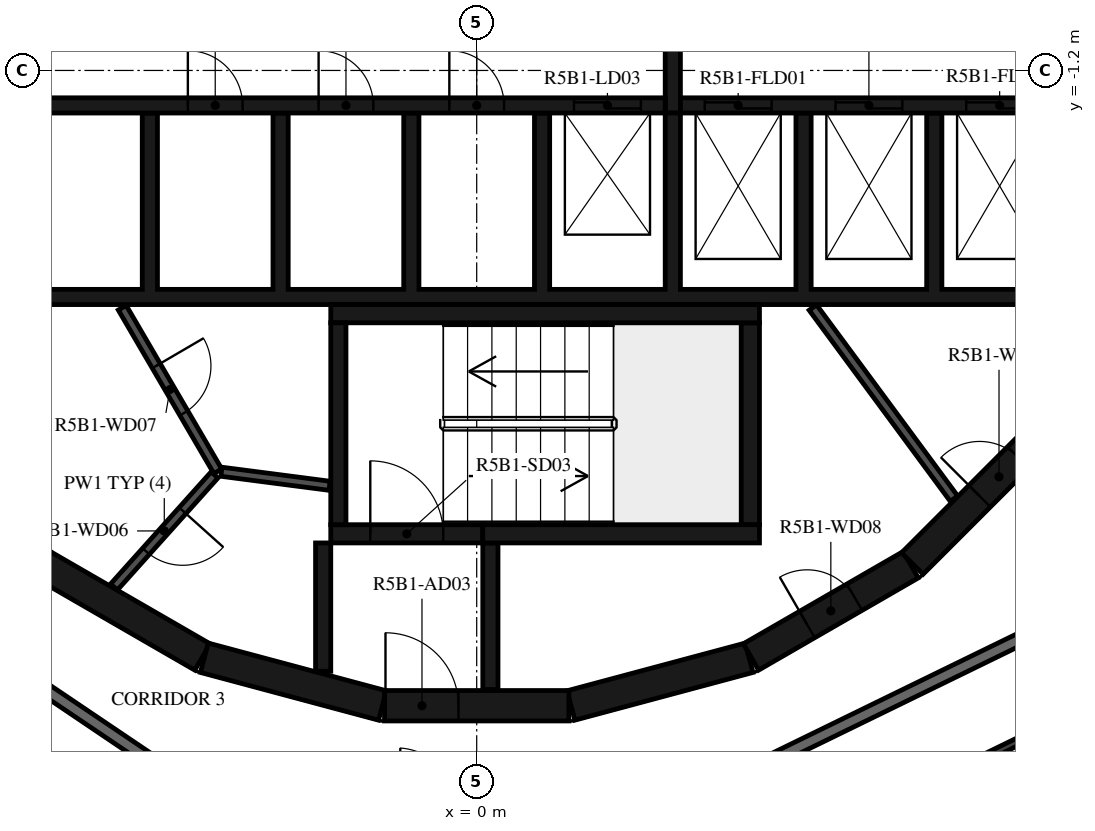
"""IFC4 building model, lengths in metres.
Left out: names, types, materials, properties, quantities, classifications, styles, units other than length and angle.
Written with IfcOpenShell. Run it as: python <this file> out.ifc"""

import sys

from ifc_helpers import new_model, si_unit, direction, frame, frame_2d, origin, place, context, subcontext, project, spatial, polyline, rectangle, outline, extrude, element, fill, save


model = new_model("IFC4")
c1 = context("Model", 3, precision=1e-05, world=origin(), true_north=direction((0.0, 1.0)))
c2 = subcontext(c1, "Body", "Model", "MODEL_VIEW")
j1 = project(units=[si_unit("LENGTHUNIT", "METRE"), si_unit("PLANEANGLEUNIT", "RADIAN")], contexts=[c1])
p1 = place(None, origin())
s1 = spatial("IfcSite", under=j1, at=p1, CompositionType="ELEMENT")
p2 = place(p1, origin())
s2 = spatial("IfcBuilding", under=s1, at=p2, CompositionType="ELEMENT")
p3 = place(p2, frame((0.0, 0.0, 198.9)))
s3 = spatial("IfcBuildingStorey", under=s2, at=p3, CompositionType="ELEMENT", Elevation=198.9)
p4 = place(p3, frame((1.55, -11.643, 0.0), z_axis=(0.0, 0.0, 1.0), x_axis=(0.965948410781, 0.258734743916, 0.0)))
e1 = element("IfcWall", 1, at=p4, inside=s3, PredefinedType="SHEAR", context=c2, shape_type="SweptSolid", body=[
    extrude(rectangle(XDim=3.033, YDim=0.5, at=frame_2d((1.516, 0.0))), origin(), (0.0, 0.0, 1.0), 3.12),
])
p5 = place(p3, frame((4.51, -10.845, 0.0), z_axis=(0.0, 0.0, 1.0), x_axis=(0.865975092491, 0.500087131594, 0.0)))
e2 = element("IfcWall", 2, at=p5, inside=s3, PredefinedType="SHEAR", context=c2, shape_type="SweptSolid", body=[
    extrude(rectangle(XDim=3.033, YDim=0.5, at=frame_2d((1.516, 0.0))), origin(), (0.0, 0.0, 1.0), 3.12),
])
p6 = place(p5, frame((1.066, 0.0, 0.0)))
e3 = element("IfcOpeningElement", 3, at=p6, cuts=e2, PredefinedType="OPENING", context=c2, shape_type="SweptSolid", body=[
    extrude(rectangle(XDim=0.9, YDim=2.1, at=frame_2d((0.45, 1.05))), frame((0.0, 0.26, 0.0), z_axis=(0.0, -1.0, 0.0), x_axis=(1.0, 0.0, 0.0)), (0.0, 0.0, 1.0), 0.52),
])
p7 = place(p3, frame((7.164, -9.308, 0.0), z_axis=(0.0, 0.0, 1.0), x_axis=(0.707106781187, 0.707106781187, 0.0)))
e4 = element("IfcWall", 4, at=p7, inside=s3, PredefinedType="SHEAR", context=c2, shape_type="SweptSolid", body=[
    extrude(rectangle(XDim=3.032, YDim=0.5, at=frame_2d((1.516, 0.0))), origin(), (0.0, 0.0, 1.0), 3.12),
])
p8 = place(p7, frame((1.566, 0.0, 0.0)))
e5 = element("IfcOpeningElement", 5, at=p8, cuts=e4, PredefinedType="OPENING", context=c2, shape_type="SweptSolid", body=[
    extrude(rectangle(XDim=0.9, YDim=2.1, at=frame_2d((0.45, 1.05))), frame((0.0, 0.26, 0.0), z_axis=(0.0, -1.0, 0.0), x_axis=(1.0, 0.0, 0.0)), (0.0, 0.0, 1.0), 0.52),
])
for number, where, z_axis, x_axis in (
    (6, (-7.137, -9.329, 0.0), (0.0, 0.0, 1.0), (0.866, -0.5, 0.0)),
    (7, (-4.479, -10.858, 0.0), (0.0, 0.0, 1.0), (0.966, -0.259, 0.0)),
):
    element("IfcWall", number, at=place(p3, frame(where, z_axis=z_axis, x_axis=x_axis)), inside=s3, PredefinedType="SHEAR", context=c2, shape_type="SweptSolid", body=[
        extrude(rectangle(XDim=3.033, YDim=0.5, at=frame_2d((1.516, 0.0))), origin(), (0.0, 0.0, 1.0), 3.12),
    ])
p9 = place(p3, frame((-1.516, -11.647, 0.0), z_axis=(0.0, 0.0, 1.0), x_axis=(1.0, 0.0, 0.0)))
e8 = element("IfcWall", 8, at=p9, inside=s3, PredefinedType="SHEAR", context=c2, shape_type="SweptSolid", body=[
    extrude(rectangle(XDim=3.033, YDim=0.5, at=frame_2d((1.516, 0.0))), origin(), (0.0, 0.0, 1.0), 3.12),
])
p10 = place(p9, frame((0.016, 0.0, 0.0)))
e9 = element("IfcOpeningElement", 9, at=p10, cuts=e8, PredefinedType="OPENING", context=c2, shape_type="SweptSolid", body=[
    extrude(rectangle(XDim=1.2, YDim=2.1, at=frame_2d((0.6, 1.05))), frame((0.0, 0.26, 0.0), z_axis=(0.0, -1.0, 0.0), x_axis=(1.0, 0.0, 0.0)), (0.0, 0.0, 1.0), 0.52),
])
p11 = place(p3, frame((-2.275, -8.67, 0.0), z_axis=(0.0, 0.0, 1.0), x_axis=(0.0, 1.0, 0.0)))
e10 = element("IfcWall", 10, at=p11, inside=s3, PredefinedType="SHEAR", context=c2, shape_type="SweptSolid", body=[
    extrude(rectangle(XDim=3.32, YDim=0.25, at=frame_2d((1.66, 0.0))), origin(), (0.0, 0.0, 1.0), 3.12),
])
p12 = place(p3, frame((-2.4, -5.2, 0.0), z_axis=(0.0, 0.0, 1.0), x_axis=(1.0, 0.0, 0.0)))
e11 = element("IfcWall", 11, at=p12, inside=s3, PredefinedType="SHEAR", context=c2, shape_type="SweptSolid", body=[
    extrude(rectangle(XDim=7.05, YDim=0.3, at=frame_2d((3.525, 0.0))), origin(), (0.0, 0.0, 1.0), 3.12),
])
p13 = place(p3, frame((4.5, -8.67, 0.0), z_axis=(0.0, 0.0, 1.0), x_axis=(0.0, 1.0, 0.0)))
e12 = element("IfcWall", 12, at=p13, inside=s3, PredefinedType="SHEAR", context=c2, shape_type="SweptSolid", body=[
    extrude(rectangle(XDim=3.32, YDim=0.3, at=frame_2d((1.66, 0.0))), origin(), (0.0, 0.0, 1.0), 3.12),
])
p14 = place(p3, frame((0.1, -8.82, 0.0), z_axis=(0.0, 0.0, 1.0), x_axis=(1.0, 0.0, 0.0)))
e13 = element("IfcWall", 13, at=p14, inside=s3, PredefinedType="SHEAR", context=c2, shape_type="SweptSolid", body=[
    extrude(rectangle(XDim=4.55, YDim=0.3, at=frame_2d((2.275, 0.0))), origin(), (0.0, 0.0, 1.0), 3.12),
])
p15 = place(p3, frame((-2.4, -8.82, 0.0), z_axis=(0.0, 0.0, 1.0), x_axis=(1.0, 0.0, 0.0)))
e14 = element("IfcWall", 14, at=p15, inside=s3, PredefinedType="SHEAR", context=c2, shape_type="SweptSolid", body=[
    extrude(rectangle(XDim=2.5, YDim=0.3, at=frame_2d((1.25, 0.0))), origin(), (0.0, 0.0, 1.0), 3.12),
])
p16 = place(p15, frame((0.65, 0.0, 0.0)))
e15 = element("IfcOpeningElement", 15, at=p16, cuts=e14, PredefinedType="OPENING", context=c2, shape_type="SweptSolid", body=[
    extrude(rectangle(XDim=1.2, YDim=2.1, at=frame_2d((0.6, 1.05))), frame((0.0, 0.16, 0.0), z_axis=(0.0, -1.0, 0.0), x_axis=(1.0, 0.0, 0.0)), (0.0, 0.0, 1.0), 0.32),
])
p17 = place(p3, frame((-2.525, -8.97, 0.0), z_axis=(0.0, 0.0, 1.0), x_axis=(0.0, -1.0, 0.0)))
e16 = element("IfcWall", 16, at=p17, inside=s3, PredefinedType="SHEAR", context=c2, shape_type="SweptSolid", body=[
    extrude(rectangle(XDim=2.11, YDim=0.25, at=frame_2d((1.055, 0.0))), origin(), (0.0, 0.0, 1.0), 3.12),
])
p18 = place(p3, frame((0.225, -8.97, 0.0), z_axis=(0.0, 0.0, 1.0), x_axis=(0.0, -1.0, 0.0)))
e17 = element("IfcWall", 17, at=p18, inside=s3, PredefinedType="SHEAR", context=c2, shape_type="SweptSolid", body=[
    extrude(rectangle(XDim=2.41, YDim=0.25, at=frame_2d((1.205, 0.0))), origin(), (0.0, 0.0, 1.0), 3.12),
])
p19 = place(p3, origin())
e18 = element("IfcWall", 18, at=p19, inside=s3, PredefinedType="SHEAR", context=c2, shape_type="SweptSolid", body=[
    extrude(outline(polyline([(9.8, -5.05), (9.8, -4.8), (9.8, -1.9), (9.55, -1.9), (9.55, -4.8), (7.65, -4.8), (7.65, -1.9), (7.4, -1.9), (7.4, -4.8), (5.5, -4.8), (5.5, -1.9), (5.25, -1.9), (5.25, -4.8), (3.35, -4.8), (3.35, -1.9), (3.1, -1.9), (3.1, -4.8), (1.2, -4.8), (1.2, -1.9), (0.95, -1.9), (0.95, -4.8), (-0.95, -4.8), (-0.95, -1.9), (-1.2, -1.9), (-1.2, -4.8), (-3.1, -4.8), (-3.1, -1.9), (-3.35, -1.9), (-3.35, -4.8), (-5.25, -4.8), (-5.25, -1.9), (-5.5, -1.9), (-5.5, -4.8), (-7.4, -4.8), (-7.4, -1.9), (-7.65, -1.9), (-7.65, -4.8), (-9.55, -4.8), (-9.55, -1.9), (-9.8, -1.9), (-9.8, -4.8), (-9.8, -5.05), (9.8, -5.05)])), origin(), (0.0, 0.0, 1.0), 3.12),
])
p20 = place(p3, frame((-11.28, -1.775, 0.0), z_axis=(0.0, 0.0, 1.0), x_axis=(1.0, 0.0, 0.0)))
e19 = element("IfcWall", 19, at=p20, inside=s3, PredefinedType="SHEAR", context=c2, shape_type="SweptSolid", body=[
    extrude(rectangle(XDim=14.38, YDim=0.25, at=frame_2d((7.19, 0.0))), origin(), (0.0, 0.0, 1.0), 3.12),
])
p21 = place(p20, frame((12.88, 0.0, 0.0)))
e20 = element("IfcOpeningElement", 20, at=p21, cuts=e19, PredefinedType="OPENING", context=c2, shape_type="SweptSolid", body=[
    extrude(rectangle(XDim=1.1, YDim=2.1, at=frame_2d((0.55, 1.05))), frame((0.0, 0.135, 0.0), z_axis=(0.0, -1.0, 0.0), x_axis=(1.0, 0.0, 0.0)), (0.0, 0.0, 1.0), 0.27),
])
p22 = place(p20, frame((6.53, 0.0, 0.0)))
e21 = element("IfcOpeningElement", 21, at=p22, cuts=e19, PredefinedType="OPENING", context=c2, shape_type="SweptSolid", body=[
    extrude(rectangle(XDim=0.9, YDim=2.1, at=frame_2d((0.45, 1.05))), frame((0.0, 0.135, 0.0), z_axis=(0.0, -1.0, 0.0), x_axis=(1.0, 0.0, 0.0)), (0.0, 0.0, 1.0), 0.27),
])
p23 = place(p20, frame((8.68, 0.0, 0.0)))
e22 = element("IfcOpeningElement", 22, at=p23, cuts=e19, PredefinedType="OPENING", context=c2, shape_type="SweptSolid", body=[
    extrude(rectangle(XDim=0.9, YDim=2.1, at=frame_2d((0.45, 1.05))), frame((0.0, 0.135, 0.0), z_axis=(0.0, -1.0, 0.0), x_axis=(1.0, 0.0, 0.0)), (0.0, 0.0, 1.0), 0.27),
])
p24 = place(p20, frame((10.83, 0.0, 0.0)))
e23 = element("IfcOpeningElement", 23, at=p24, cuts=e19, PredefinedType="OPENING", context=c2, shape_type="SweptSolid", body=[
    extrude(rectangle(XDim=0.9, YDim=2.1, at=frame_2d((0.45, 1.05))), frame((0.0, 0.135, 0.0), z_axis=(0.0, -1.0, 0.0), x_axis=(1.0, 0.0, 0.0)), (0.0, 0.0, 1.0), 0.27),
])
p25 = place(p3, frame((3.35, -1.775, 0.0), z_axis=(0.0, 0.0, 1.0), x_axis=(1.0, 0.0, 0.0)))
e24 = element("IfcWall", 24, at=p25, inside=s3, PredefinedType="SHEAR", context=c2, shape_type="SweptSolid", body=[
    extrude(rectangle(XDim=7.93, YDim=0.25, at=frame_2d((3.965, 0.0))), origin(), (0.0, 0.0, 1.0), 3.12),
])
p26 = place(p25, frame((0.4, 0.0, 0.0)))
e25 = element("IfcOpeningElement", 25, at=p26, cuts=e24, PredefinedType="OPENING", context=c2, shape_type="SweptSolid", body=[
    extrude(rectangle(XDim=1.1, YDim=2.4, at=frame_2d((0.55, 1.2))), frame((0.0, 0.135, 0.0), z_axis=(0.0, -1.0, 0.0), x_axis=(1.0, 0.0, 0.0)), (0.0, 0.0, 1.0), 0.27),
])
p27 = place(p25, frame((2.55, 0.0, 0.0)))
e26 = element("IfcOpeningElement", 26, at=p27, cuts=e24, PredefinedType="OPENING", context=c2, shape_type="SweptSolid", body=[
    extrude(rectangle(XDim=1.1, YDim=2.4, at=frame_2d((0.55, 1.2))), frame((0.0, 0.135, 0.0), z_axis=(0.0, -1.0, 0.0), x_axis=(1.0, 0.0, 0.0)), (0.0, 0.0, 1.0), 0.27),
])
p28 = place(p25, frame((4.7, 0.0, 0.0)))
e27 = element("IfcOpeningElement", 27, at=p28, cuts=e24, PredefinedType="OPENING", context=c2, shape_type="SweptSolid", body=[
    extrude(rectangle(XDim=1.1, YDim=2.4, at=frame_2d((0.55, 1.2))), frame((0.0, 0.135, 0.0), z_axis=(0.0, -1.0, 0.0), x_axis=(1.0, 0.0, 0.0)), (0.0, 0.0, 1.0), 0.27),
])
p29 = place(p3, frame((3.225, -1.9, 0.0), z_axis=(0.0, 0.0, 1.0), x_axis=(0.0, 1.0, 0.0)))
e28 = element("IfcWall", 28, at=p29, inside=s3, PredefinedType="SHEAR", context=c2, shape_type="SweptSolid", body=[
    extrude(rectangle(XDim=3.8, YDim=0.25, at=frame_2d((1.9, 0.0))), origin(), (0.0, 0.0, 1.0), 3.12),
])
p30 = place(p3, frame((5.528, -5.098, 0.0), z_axis=(0.0, 0.0, 1.0), x_axis=(0.594034318069, -0.804439698769, 0.0)))
e29 = element("IfcWall", 29, at=p30, inside=s3, PredefinedType="PARTITIONING", context=c2, shape_type="SweptSolid", body=[
    extrude(rectangle(XDim=3.907, YDim=0.15, at=frame_2d((1.953, 0.0))), origin(), (0.0, 0.0, 1.0), 3.12),
])
p31 = place(p3, frame((-5.829, -5.102, 0.0), z_axis=(0.0, 0.0, 1.0), x_axis=(0.504480008384, -0.863423373057, 0.0)))
e30 = element("IfcWall", 30, at=p31, inside=s3, PredefinedType="PARTITIONING", context=c2, shape_type="SweptSolid", body=[
    extrude(rectangle(XDim=3.115, YDim=0.15, at=frame_2d((1.558, 0.0))), origin(), (0.0, 0.0, 1.0), 3.12),
])
p32 = place(p31, frame((1.107, 0.0, 0.0)))
e31 = element("IfcOpeningElement", 31, at=p32, cuts=e30, PredefinedType="OPENING", context=c2, shape_type="SweptSolid", body=[
    extrude(rectangle(XDim=0.9, YDim=2.1, at=frame_2d((0.45, 1.05))), frame((0.0, 0.085, 0.0), z_axis=(0.0, -1.0, 0.0), x_axis=(1.0, 0.0, 0.0)), (0.0, 0.0, 1.0), 0.17),
])
p33 = place(p3, frame((-4.311, -7.851, 0.0), z_axis=(0.0, 0.0, 1.0), x_axis=(-0.667869133096, -0.744278725383, 0.0)))
e32 = element("IfcWall", 32, at=p33, inside=s3, PredefinedType="PARTITIONING", context=c2, shape_type="SweptSolid", body=[
    extrude(rectangle(XDim=2.476, YDim=0.15, at=frame_2d((1.238, 0.0))), origin(), (0.0, 0.0, 1.0), 3.12),
])
p34 = place(p33, frame((0.788, 0.0, 0.0)))
e33 = element("IfcOpeningElement", 33, at=p34, cuts=e32, PredefinedType="OPENING", context=c2, shape_type="SweptSolid", body=[
    extrude(rectangle(XDim=0.9, YDim=2.1, at=frame_2d((0.45, 1.05))), frame((0.0, 0.085, 0.0), z_axis=(0.0, -1.0, 0.0), x_axis=(1.0, 0.0, 0.0)), (0.0, 0.0, 1.0), 0.17),
])
p35 = place(p3, frame((-4.198, -7.799, 0.0), z_axis=(0.0, 0.0, 1.0), x_axis=(0.991686747293, -0.128675542523, 0.0)))
e34 = element("IfcWall", 34, at=p35, inside=s3, PredefinedType="PARTITIONING", context=c2, shape_type="SweptSolid", body=[
    extrude(rectangle(XDim=1.793, YDim=0.15, at=frame_2d((0.896, 0.0))), origin(), (0.0, 0.0, 1.0), 3.12),
])
p36 = place(p3, frame((-10.47, -9.101, 0.0), z_axis=(0.0, 0.0, 1.0), x_axis=(0.829035841718, -0.559195469534, 0.0)))
e35 = element("IfcWall", 35, at=p36, inside=s3, PredefinedType="STANDARD", context=c2, shape_type="SweptSolid", body=[
    extrude(rectangle(XDim=7.181, YDim=0.2, at=frame_2d((3.591, 0.0))), origin(), (0.0, 0.0, 1.0), 3.12),
])
p37 = place(p36, frame((2.39, 0.0, 0.0)))
e36 = element("IfcOpeningElement", 36, at=p37, cuts=e35, PredefinedType="OPENING", context=c2, shape_type="SweptSolid", body=[
    extrude(rectangle(XDim=1.0, YDim=2.1, at=frame_2d((0.5, 1.05))), frame((0.0, 0.11, 0.0), z_axis=(0.0, -1.0, 0.0), x_axis=(1.0, 0.0, 0.0)), (0.0, 0.0, 1.0), 0.22),
])
p38 = place(p3, frame((2.647, -13.618, 0.0), z_axis=(0.0, 0.0, 1.0), x_axis=(0.898796543751, 0.438366026218, 0.0)))
e37 = element("IfcWall", 37, at=p38, inside=s3, PredefinedType="STANDARD", context=c2, shape_type="SweptSolid", body=[
    extrude(rectangle(XDim=7.181, YDim=0.2, at=frame_2d((3.591, 0.0))), origin(), (0.0, 0.0, 1.0), 3.12),
])
p39 = place(p38, frame((0.2, 0.0, 0.0)))
e38 = element("IfcOpeningElement", 38, at=p39, cuts=e37, PredefinedType="OPENING", context=c2, shape_type="SweptSolid", body=[
    extrude(rectangle(XDim=1.0, YDim=2.1, at=frame_2d((0.5, 1.05))), frame((0.0, 0.11, 0.0), z_axis=(0.0, -1.0, 0.0), x_axis=(1.0, 0.0, 0.0)), (0.0, 0.0, 1.0), 0.22),
])
p40 = place(p3, frame((-11.642, -10.12, 0.0), z_axis=(0.0, 0.0, 1.0), x_axis=(0.829033377599, -0.559199122698, 0.0)))
e39 = element("IfcWall", 39, at=p40, inside=s3, PredefinedType="PARTITIONING", context=c2, shape_type="SweptSolid", body=[
    extrude(rectangle(XDim=5.638, YDim=0.12, at=frame_2d((2.819, 0.0))), origin(), (0.0, 0.0, 1.0), 3.12),
])
p41 = place(p40, frame((0.2, 0.0, 0.0)))
e40 = element("IfcOpeningElement", 40, at=p41, cuts=e39, PredefinedType="OPENING", context=c2, shape_type="SweptSolid", body=[
    extrude(rectangle(XDim=0.9, YDim=2.1, at=frame_2d((0.45, 1.05))), frame((0.0, 0.07, 0.0), z_axis=(0.0, -1.0, 0.0), x_axis=(1.0, 0.0, 0.0)), (0.0, 0.0, 1.0), 0.14),
])
p42 = place(p40, frame((4.192, 0.0, 0.0)))
e41 = element("IfcOpeningElement", 41, at=p42, cuts=e39, PredefinedType="OPENING", context=c2, shape_type="SweptSolid", body=[
    extrude(rectangle(XDim=0.9, YDim=2.1, at=frame_2d((0.45, 1.05))), frame((0.0, 0.07, 0.0), z_axis=(0.0, -1.0, 0.0), x_axis=(1.0, 0.0, 0.0)), (0.0, 0.0, 1.0), 0.14),
])
p43 = place(p3, frame((3.074, -15.078, 0.0), z_axis=(0.0, 0.0, 1.0), x_axis=(0.898793586225, 0.43837209008, 0.0)))
e42 = element("IfcWall", 42, at=p43, inside=s3, PredefinedType="PARTITIONING", context=c2, shape_type="SweptSolid", body=[
    extrude(rectangle(XDim=7.839, YDim=0.12, at=frame_2d((3.92, 0.0))), origin(), (0.0, 0.0, 1.0), 3.12),
])
p44 = place(p43, frame((0.2, 0.0, 0.0)))
e43 = element("IfcOpeningElement", 43, at=p44, cuts=e42, PredefinedType="OPENING", context=c2, shape_type="SweptSolid", body=[
    extrude(rectangle(XDim=0.9, YDim=2.1, at=frame_2d((0.45, 1.05))), frame((0.0, 0.07, 0.0), z_axis=(0.0, -1.0, 0.0), x_axis=(1.0, 0.0, 0.0)), (0.0, 0.0, 1.0), 0.14),
])
p45 = place(p16, origin())
e44 = element("IfcDoor", 44, at=p45, inside=s3, OperationType="SINGLE_SWING_LEFT", PredefinedType="DOOR", context=c2, shape_type="SweptSolid", body=[
    extrude(rectangle(XDim=1.2, YDim=2.1, at=frame_2d((0.6, 1.05))), frame((0.0, 0.025, 0.0), z_axis=(0.0, -1.0, 0.0), x_axis=(1.0, 0.0, 0.0)), (0.0, 0.0, 1.0), 0.05),
])
fill(e15, e44)
p46 = place(p10, origin())
e45 = element("IfcDoor", 45, at=p46, inside=s3, OperationType="SINGLE_SWING_RIGHT", PredefinedType="DOOR", context=c2, shape_type="SweptSolid", body=[
    extrude(rectangle(XDim=1.2, YDim=2.1, at=frame_2d((0.6, 1.05))), frame((0.0, 0.025, 0.0), z_axis=(0.0, -1.0, 0.0), x_axis=(1.0, 0.0, 0.0)), (0.0, 0.0, 1.0), 0.05),
])
fill(e9, e45)
p47 = place(p21, origin())
e46 = element("IfcDoor", 46, at=p47, inside=s3, OperationType="DOUBLE_DOOR_SLIDING", PredefinedType="DOOR", context=c2, shape_type="SweptSolid", body=[
    extrude(rectangle(XDim=1.1, YDim=2.1, at=frame_2d((0.55, 1.05))), frame((0.0, 0.025, 0.0), z_axis=(0.0, -1.0, 0.0), x_axis=(1.0, 0.0, 0.0)), (0.0, 0.0, 1.0), 0.05),
])
fill(e20, e46)
p48 = place(p26, origin())
e47 = element("IfcDoor", 47, at=p48, inside=s3, OperationType="DOUBLE_DOOR_SLIDING", PredefinedType="DOOR", context=c2, shape_type="SweptSolid", body=[
    extrude(rectangle(XDim=1.1, YDim=2.4, at=frame_2d((0.55, 1.2))), frame((0.0, 0.025, 0.0), z_axis=(0.0, -1.0, 0.0), x_axis=(1.0, 0.0, 0.0)), (0.0, 0.0, 1.0), 0.05),
])
fill(e25, e47)
p49 = place(p27, origin())
e48 = element("IfcDoor", 48, at=p49, inside=s3, OperationType="DOUBLE_DOOR_SLIDING", PredefinedType="DOOR", context=c2, shape_type="SweptSolid", body=[
    extrude(rectangle(XDim=1.1, YDim=2.4, at=frame_2d((0.55, 1.2))), frame((0.0, 0.025, 0.0), z_axis=(0.0, -1.0, 0.0), x_axis=(1.0, 0.0, 0.0)), (0.0, 0.0, 1.0), 0.05),
])
fill(e26, e48)
p50 = place(p28, origin())
e49 = element("IfcDoor", 49, at=p50, inside=s3, OperationType="DOUBLE_DOOR_SLIDING", PredefinedType="DOOR", context=c2, shape_type="SweptSolid", body=[
    extrude(rectangle(XDim=1.1, YDim=2.4, at=frame_2d((0.55, 1.2))), frame((0.0, 0.025, 0.0), z_axis=(0.0, -1.0, 0.0), x_axis=(1.0, 0.0, 0.0)), (0.0, 0.0, 1.0), 0.05),
])
fill(e27, e49)
p51 = place(p22, origin())
e50 = element("IfcDoor", 50, at=p51, inside=s3, OperationType="SINGLE_SWING_LEFT", PredefinedType="DOOR", context=c2, shape_type="SweptSolid", body=[
    extrude(rectangle(XDim=0.9, YDim=2.1, at=frame_2d((0.45, 1.05))), frame((0.0, 0.025, 0.0), z_axis=(0.0, -1.0, 0.0), x_axis=(1.0, 0.0, 0.0)), (0.0, 0.0, 1.0), 0.05),
])
fill(e21, e50)
p52 = place(p23, origin())
e51 = element("IfcDoor", 51, at=p52, inside=s3, OperationType="SINGLE_SWING_RIGHT", PredefinedType="DOOR", context=c2, shape_type="SweptSolid", body=[
    extrude(rectangle(XDim=0.9, YDim=2.1, at=frame_2d((0.45, 1.05))), frame((0.0, 0.025, 0.0), z_axis=(0.0, -1.0, 0.0), x_axis=(1.0, 0.0, 0.0)), (0.0, 0.0, 1.0), 0.05),
])
fill(e22, e51)
p53 = place(p24, origin())
e52 = element("IfcDoor", 52, at=p53, inside=s3, OperationType="SINGLE_SWING_LEFT", PredefinedType="DOOR", context=c2, shape_type="SweptSolid", body=[
    extrude(rectangle(XDim=0.9, YDim=2.1, at=frame_2d((0.45, 1.05))), frame((0.0, 0.025, 0.0), z_axis=(0.0, -1.0, 0.0), x_axis=(1.0, 0.0, 0.0)), (0.0, 0.0, 1.0), 0.05),
])
fill(e23, e52)
p54 = place(p34, origin())
e53 = element("IfcDoor", 53, at=p54, inside=s3, OperationType="SINGLE_SWING_RIGHT", PredefinedType="DOOR", context=c2, shape_type="SweptSolid", body=[
    extrude(rectangle(XDim=0.9, YDim=2.1, at=frame_2d((0.45, 1.05))), frame((0.0, 0.025, 0.0), z_axis=(0.0, -1.0, 0.0), x_axis=(1.0, 0.0, 0.0)), (0.0, 0.0, 1.0), 0.05),
])
fill(e33, e53)
p55 = place(p32, origin())
e54 = element("IfcDoor", 54, at=p55, inside=s3, OperationType="SINGLE_SWING_LEFT", PredefinedType="DOOR", context=c2, shape_type="SweptSolid", body=[
    extrude(rectangle(XDim=0.9, YDim=2.1, at=frame_2d((0.45, 1.05))), frame((0.0, 0.025, 0.0), z_axis=(0.0, -1.0, 0.0), x_axis=(1.0, 0.0, 0.0)), (0.0, 0.0, 1.0), 0.05),
])
fill(e31, e54)
p56 = place(p6, origin())
e55 = element("IfcDoor", 55, at=p56, inside=s3, OperationType="SINGLE_SWING_RIGHT", PredefinedType="DOOR", context=c2, shape_type="SweptSolid", body=[
    extrude(rectangle(XDim=0.9, YDim=2.1, at=frame_2d((0.45, 1.05))), frame((0.0, 0.025, 0.0), z_axis=(0.0, -1.0, 0.0), x_axis=(1.0, 0.0, 0.0)), (0.0, 0.0, 1.0), 0.05),
])
fill(e3, e55)
p57 = place(p8, origin())
e56 = element("IfcDoor", 56, at=p57, inside=s3, OperationType="SINGLE_SWING_LEFT", PredefinedType="DOOR", context=c2, shape_type="SweptSolid", body=[
    extrude(rectangle(XDim=0.9, YDim=2.1, at=frame_2d((0.45, 1.05))), frame((0.0, 0.025, 0.0), z_axis=(0.0, -1.0, 0.0), x_axis=(1.0, 0.0, 0.0)), (0.0, 0.0, 1.0), 0.05),
])
fill(e5, e56)
save(model, sys.argv[1])
